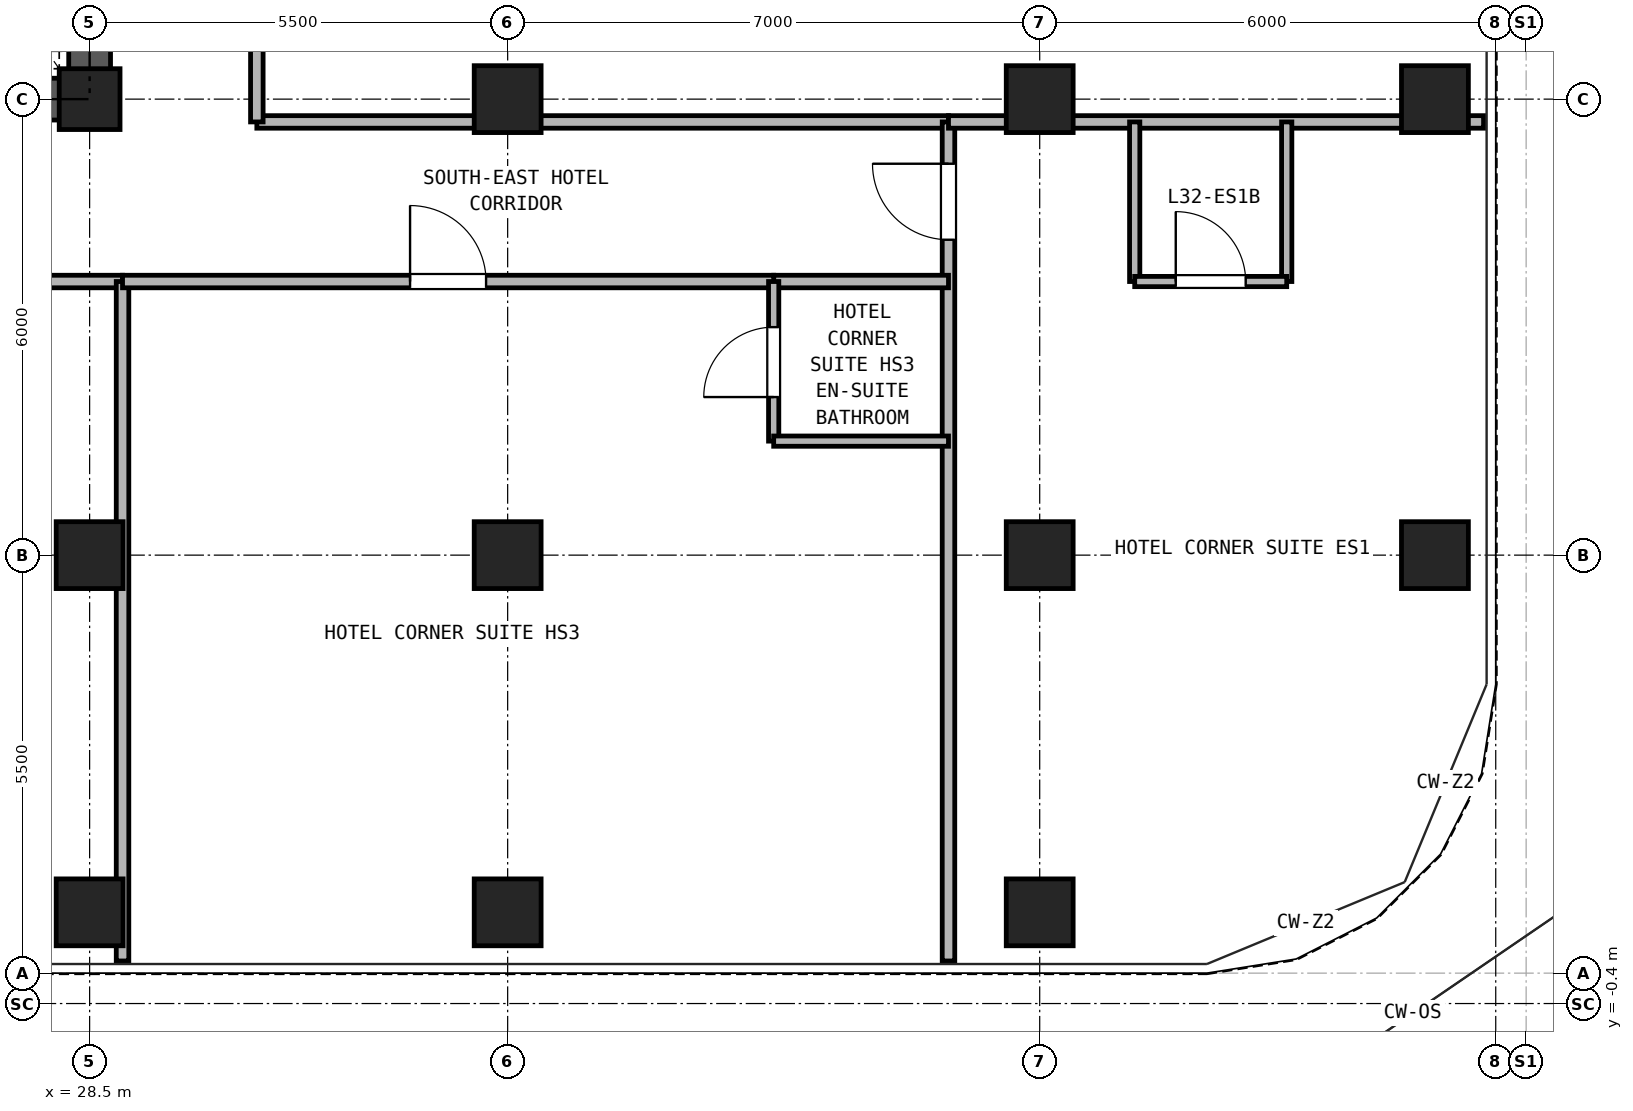
"""IFC4 building model, lengths in metres.
Left out: names, types, materials, properties, quantities, classifications, styles, units other than length and angle.
Written with IfcOpenShell. Run it as: python <this file> out.ifc"""

import sys

from ifc_helpers import new_model, si_unit, direction, frame, frame_2d, origin, origin_2d, place, context, subcontext, project, spatial, rectangle, hollow_rectangle, extrude, source, transform, mapped, element, fill, save


model = new_model("IFC4")
c1 = context("Model", 3, precision=1e-05, world=origin(), true_north=direction((0.0, 1.0)))
c2 = subcontext(c1, "Body", "Model", "MODEL_VIEW")
j1 = project(units=[si_unit("LENGTHUNIT", "METRE"), si_unit("PLANEANGLEUNIT", "RADIAN")], contexts=[c1])
p1 = place(None, origin())
s1 = spatial("IfcSite", under=j1, at=p1, CompositionType="ELEMENT")
p2 = place(p1, origin())
s2 = spatial("IfcBuilding", under=s1, at=p2, CompositionType="ELEMENT")
p3 = place(p2, frame((0.0, 0.0, 118.3)))
s3 = spatial("IfcBuildingStorey", under=s2, at=p3, CompositionType="ELEMENT", Elevation=118.3)
m1 = source(origin(), c2, "Body", "SweptSolid", [
    extrude(hollow_rectangle(XDim=0.88, YDim=0.88, WallThickness=0.05, at=origin_2d()), origin(), (0.0, 0.0, 1.0), 2.95),
])
for number, where, z_axis, x_axis in (
    (1, (28.5, 0.8, 0.0), (0.0, 0.0, 1.0), (1.0, 0.0, 0.0)),
    (2, (34.0, 0.8, 0.0), (0.0, 0.0, 1.0), (1.0, 0.0, 0.0)),
    (3, (41.0, 0.8, 0.0), (0.0, 0.0, 1.0), (1.0, 0.0, 0.0)),
    (4, (46.2, 5.5, 0.0), (0.0, 0.0, 1.0), (1.0, 0.0, 0.0)),
    (5, (46.2, 11.5, 0.0), (0.0, 0.0, 1.0), (1.0, 0.0, 0.0)),
    (6, (28.5, 5.5, 0.0), (0.0, 0.0, 1.0), (1.0, 0.0, 0.0)),
):
    element("IfcColumn", number, at=place(p3, frame(where, z_axis=z_axis, x_axis=x_axis)), inside=s3, PredefinedType="COLUMN", context=c2, shape_type="MappedRepresentation", body=[
        mapped(m1, transform((0.0, 0.0, 0.0), x_axis=(1.0, 0.0, 0.0), y_axis=(0.0, 1.0, 0.0), z_axis=(0.0, 0.0, 1.0), scale=1.0)),
    ])
m2 = source(origin(), c2, "Body", "SweptSolid", [
    extrude(hollow_rectangle(XDim=0.8, YDim=0.8, WallThickness=0.045, at=origin_2d()), origin(), (0.0, 0.0, 1.0), 2.95),
])
p4 = place(p3, frame((28.5, 11.5, 0.0), z_axis=(0.0, 0.0, 1.0), x_axis=(1.0, 0.0, 0.0)))
e7 = element("IfcColumn", 7, at=p4, inside=s3, PredefinedType="COLUMN", context=c2, shape_type="MappedRepresentation", body=[
    mapped(m2, transform((0.0, 0.0, 0.0), x_axis=(1.0, 0.0, 0.0), y_axis=(0.0, 1.0, 0.0), z_axis=(0.0, 0.0, 1.0), scale=1.0)),
])
for number, where, z_axis, x_axis in (
    (8, (34.0, 5.5, 0.0), (0.0, 0.0, 1.0), (1.0, 0.0, 0.0)),
    (9, (34.0, 11.5, 0.0), (0.0, 0.0, 1.0), (1.0, 0.0, 0.0)),
    (10, (41.0, 5.5, 0.0), (0.0, 0.0, 1.0), (1.0, 0.0, 0.0)),
    (11, (41.0, 11.5, 0.0), (0.0, 0.0, 1.0), (1.0, 0.0, 0.0)),
):
    element("IfcColumn", number, at=place(p3, frame(where, z_axis=z_axis, x_axis=x_axis)), inside=s3, PredefinedType="COLUMN", context=c2, shape_type="MappedRepresentation", body=[
        mapped(m1, transform((0.0, 0.0, 0.0), x_axis=(1.0, 0.0, 0.0), y_axis=(0.0, 1.0, 0.0), z_axis=(0.0, 0.0, 1.0), scale=1.0)),
    ])
p5 = place(p3, frame((18.225, 11.5, 0.0), z_axis=(0.0, 0.0, 1.0), x_axis=(1.0, 0.0, 0.0)))
e12 = element("IfcWall", 12, at=p5, inside=s3, PredefinedType="SHEAR", context=c2, shape_type="SweptSolid", body=[
    extrude(rectangle(XDim=10.55, YDim=0.55, at=frame_2d((5.275, 0.0))), origin(), (0.0, 0.0, 1.0), 2.95),
])
p6 = place(p5, frame((2.375, 0.0, 0.0)))
e13 = element("IfcOpeningElement", 13, at=p6, cuts=e12, PredefinedType="OPENING", context=c2, shape_type="SweptSolid", body=[
    extrude(rectangle(XDim=0.95, YDim=2.15, at=frame_2d((0.475, 1.075))), frame((0.0, 0.285, 0.0), z_axis=(0.0, -1.0, 0.0), x_axis=(1.0, 0.0, 0.0)), (0.0, 0.0, 1.0), 0.57),
])
p7 = place(p5, frame((5.875, 0.0, 0.0)))
e14 = element("IfcOpeningElement", 14, at=p7, cuts=e12, PredefinedType="OPENING", context=c2, shape_type="SweptSolid", body=[
    extrude(rectangle(XDim=1.1, YDim=2.25, at=frame_2d((0.55, 1.125))), frame((0.0, 0.285, 0.0), z_axis=(0.0, -1.0, 0.0), x_axis=(1.0, 0.0, 0.0)), (0.0, 0.0, 1.0), 0.57),
])
p8 = place(p5, frame((8.275, 0.0, 0.0)))
e15 = element("IfcOpeningElement", 15, at=p8, cuts=e12, PredefinedType="OPENING", context=c2, shape_type="SweptSolid", body=[
    extrude(rectangle(XDim=1.1, YDim=2.25, at=frame_2d((0.55, 1.125))), frame((0.0, 0.285, 0.0), z_axis=(0.0, -1.0, 0.0), x_axis=(1.0, 0.0, 0.0)), (0.0, 0.0, 1.0), 0.57),
])
p9 = place(p3, frame((28.5, 11.775, 0.0), z_axis=(0.0, 0.0, 1.0), x_axis=(0.0, 1.0, 0.0)))
e16 = element("IfcWall", 16, at=p9, inside=s3, PredefinedType="SHEAR", context=c2, shape_type="SweptSolid", body=[
    extrude(rectangle(XDim=16.7, YDim=0.55, at=frame_2d((8.35, 0.0))), origin(), (0.0, 0.0, 1.0), 2.95),
])
p10 = place(p9, frame((7.375, 0.0, 0.0)))
e17 = element("IfcOpeningElement", 17, at=p10, cuts=e16, PredefinedType="OPENING", context=c2, shape_type="SweptSolid", body=[
    extrude(rectangle(XDim=1.15, YDim=2.2, at=frame_2d((0.575, 1.1))), frame((0.0, 0.285, 0.0), z_axis=(0.0, -1.0, 0.0), x_axis=(1.0, 0.0, 0.0)), (0.0, 0.0, 1.0), 0.57),
])
p11 = place(p3, frame((30.7, 11.2, 0.0), z_axis=(0.0, 0.0, 1.0), x_axis=(1.0, 0.0, 0.0)))
e18 = element("IfcWall", 18, at=p11, inside=s3, PredefinedType="PARTITIONING", context=c2, shape_type="SweptSolid", body=[
    extrude(rectangle(XDim=9.1, YDim=0.165, at=frame_2d((4.55, 0.0))), origin(), (0.0, 0.0, 1.0), 2.95),
])
p12 = place(p3, frame((30.7, 11.2, 0.0), z_axis=(0.0, 0.0, 1.0), x_axis=(0.0, 1.0, 0.0)))
e19 = element("IfcWall", 19, at=p12, inside=s3, PredefinedType="PARTITIONING", context=c2, shape_type="SweptSolid", body=[
    extrude(rectangle(XDim=18.75, YDim=0.165, at=frame_2d((9.375, 0.0))), origin(), (0.0, 0.0, 1.0), 2.95),
])
p13 = place(p12, frame((2.6, 0.0, 0.0)))
e20 = element("IfcOpeningElement", 20, at=p13, cuts=e19, PredefinedType="OPENING", context=c2, shape_type="SweptSolid", body=[
    extrude(rectangle(XDim=0.95, YDim=2.15, at=frame_2d((0.475, 1.075))), frame((0.0, 0.093, 0.0), z_axis=(0.0, -1.0, 0.0), x_axis=(1.0, 0.0, 0.0)), (0.0, 0.0, 1.0), 0.185),
])
p14 = place(p12, frame((8.8, 0.0, 0.0)))
e21 = element("IfcOpeningElement", 21, at=p14, cuts=e19, PredefinedType="OPENING", context=c2, shape_type="SweptSolid", body=[
    extrude(rectangle(XDim=0.95, YDim=2.15, at=frame_2d((0.475, 1.075))), frame((0.0, 0.093, 0.0), z_axis=(0.0, -1.0, 0.0), x_axis=(1.0, 0.0, 0.0)), (0.0, 0.0, 1.0), 0.185),
])
p15 = place(p12, frame((15.075, 0.0, 0.0)))
e22 = element("IfcOpeningElement", 22, at=p15, cuts=e19, PredefinedType="OPENING", context=c2, shape_type="SweptSolid", body=[
    extrude(rectangle(XDim=0.95, YDim=2.15, at=frame_2d((0.475, 1.075))), frame((0.0, 0.093, 0.0), z_axis=(0.0, -1.0, 0.0), x_axis=(1.0, 0.0, 0.0)), (0.0, 0.0, 1.0), 0.185),
])
p16 = place(p3, frame((39.8, 0.16, 0.0), z_axis=(0.0, 0.0, 1.0), x_axis=(0.0, 1.0, 0.0)))
e23 = element("IfcWall", 23, at=p16, inside=s3, PredefinedType="PARTITIONING", context=c2, shape_type="SweptSolid", body=[
    extrude(rectangle(XDim=11.04, YDim=0.165, at=frame_2d((5.52, 0.0))), origin(), (0.0, 0.0, 1.0), 2.95),
])
p17 = place(p16, frame((9.49, 0.0, 0.0)))
e24 = element("IfcOpeningElement", 24, at=p17, cuts=e23, PredefinedType="OPENING", context=c2, shape_type="SweptSolid", body=[
    extrude(rectangle(XDim=1.0, YDim=2.15, at=frame_2d((0.5, 1.075))), frame((0.0, 0.093, 0.0), z_axis=(0.0, -1.0, 0.0), x_axis=(1.0, 0.0, 0.0)), (0.0, 0.0, 1.0), 0.185),
])
p18 = place(p3, frame((39.8, 11.2, 0.0), z_axis=(0.0, 0.0, 1.0), x_axis=(1.0, 0.0, 0.0)))
e25 = element("IfcWall", 25, at=p18, inside=s3, PredefinedType="PARTITIONING", context=c2, shape_type="SweptSolid", body=[
    extrude(rectangle(XDim=7.04, YDim=0.165, at=frame_2d((3.52, 0.0))), origin(), (0.0, 0.0, 1.0), 2.95),
])
for number, where, z_axis, x_axis in (
    (26, (42.25, 9.1, 0.0), (0.0, 0.0, 1.0), (0.0, 1.0, 0.0)),
    (27, (44.25, 9.1, 0.0), (0.0, 0.0, 1.0), (0.0, 1.0, 0.0)),
):
    element("IfcWall", number, at=place(p3, frame(where, z_axis=z_axis, x_axis=x_axis)), inside=s3, PredefinedType="PARTITIONING", context=c2, shape_type="SweptSolid", body=[
        extrude(rectangle(XDim=2.1, YDim=0.135, at=frame_2d((1.05, 0.0))), origin(), (0.0, 0.0, 1.0), 2.95),
    ])
p19 = place(p3, frame((42.25, 9.1, 0.0), z_axis=(0.0, 0.0, 1.0), x_axis=(1.0, 0.0, 0.0)))
e28 = element("IfcWall", 28, at=p19, inside=s3, PredefinedType="PARTITIONING", context=c2, shape_type="SweptSolid", body=[
    extrude(rectangle(XDim=2.0, YDim=0.135, at=frame_2d((1.0, 0.0))), origin(), (0.0, 0.0, 1.0), 2.95),
])
p20 = place(p19, frame((0.54, 0.0, 0.0)))
e29 = element("IfcOpeningElement", 29, at=p20, cuts=e28, PredefinedType="OPENING", context=c2, shape_type="SweptSolid", body=[
    extrude(rectangle(XDim=0.92, YDim=2.1, at=frame_2d((0.46, 1.05))), frame((0.0, 0.077, 0.0), z_axis=(0.0, -1.0, 0.0), x_axis=(1.0, 0.0, 0.0)), (0.0, 0.0, 1.0), 0.155),
])
p21 = place(p3, frame((20.367, 9.1, 0.0), z_axis=(0.0, 0.0, 1.0), x_axis=(1.0, 0.0, 0.0)))
e30 = element("IfcWall", 30, at=p21, inside=s3, PredefinedType="PARTITIONING", context=c2, shape_type="SweptSolid", body=[
    extrude(rectangle(XDim=8.566, YDim=0.165, at=frame_2d((4.283, 0.0))), origin(), (0.0, 0.0, 1.0), 2.95),
])
p22 = place(p21, frame((3.783, 0.0, 0.0)))
e31 = element("IfcOpeningElement", 31, at=p22, cuts=e30, PredefinedType="OPENING", context=c2, shape_type="SweptSolid", body=[
    extrude(rectangle(XDim=1.0, YDim=2.15, at=frame_2d((0.5, 1.075))), frame((0.0, 0.093, 0.0), z_axis=(0.0, -1.0, 0.0), x_axis=(1.0, 0.0, 0.0)), (0.0, 0.0, 1.0), 0.185),
])
p23 = place(p3, frame((28.933, 0.16, 0.0), z_axis=(0.0, 0.0, 1.0), x_axis=(0.0, 1.0, 0.0)))
e32 = element("IfcWall", 32, at=p23, inside=s3, PredefinedType="PARTITIONING", context=c2, shape_type="SweptSolid", body=[
    extrude(rectangle(XDim=8.94, YDim=0.165, at=frame_2d((4.47, 0.0))), origin(), (0.0, 0.0, 1.0), 2.95),
])
p24 = place(p3, frame((37.5, 9.1, 0.0), z_axis=(0.0, 0.0, 1.0), x_axis=(1.0, 0.0, 0.0)))
e33 = element("IfcWall", 33, at=p24, inside=s3, PredefinedType="PARTITIONING", context=c2, shape_type="SweptSolid", body=[
    extrude(rectangle(XDim=2.3, YDim=0.165, at=frame_2d((1.15, 0.0))), origin(), (0.0, 0.0, 1.0), 2.95),
])
p25 = place(p3, frame((28.933, 9.1, 0.0), z_axis=(0.0, 0.0, 1.0), x_axis=(1.0, 0.0, 0.0)))
e34 = element("IfcWall", 34, at=p25, inside=s3, PredefinedType="PARTITIONING", context=c2, shape_type="SweptSolid", body=[
    extrude(rectangle(XDim=8.567, YDim=0.165, at=frame_2d((4.283, 0.0))), origin(), (0.0, 0.0, 1.0), 2.95),
])
p26 = place(p25, frame((3.783, 0.0, 0.0)))
e35 = element("IfcOpeningElement", 35, at=p26, cuts=e34, PredefinedType="OPENING", context=c2, shape_type="SweptSolid", body=[
    extrude(rectangle(XDim=1.0, YDim=2.15, at=frame_2d((0.5, 1.075))), frame((0.0, 0.093, 0.0), z_axis=(0.0, -1.0, 0.0), x_axis=(1.0, 0.0, 0.0)), (0.0, 0.0, 1.0), 0.185),
])
p27 = place(p3, frame((37.5, 7.0, 0.0), z_axis=(0.0, 0.0, 1.0), x_axis=(0.0, 1.0, 0.0)))
e36 = element("IfcWall", 36, at=p27, inside=s3, PredefinedType="PARTITIONING", context=c2, shape_type="SweptSolid", body=[
    extrude(rectangle(XDim=2.1, YDim=0.135, at=frame_2d((1.05, 0.0))), origin(), (0.0, 0.0, 1.0), 2.95),
])
p28 = place(p27, frame((0.58, 0.0, 0.0)))
e37 = element("IfcOpeningElement", 37, at=p28, cuts=e36, PredefinedType="OPENING", context=c2, shape_type="SweptSolid", body=[
    extrude(rectangle(XDim=0.92, YDim=2.1, at=frame_2d((0.46, 1.05))), frame((0.0, 0.077, 0.0), z_axis=(0.0, -1.0, 0.0), x_axis=(1.0, 0.0, 0.0)), (0.0, 0.0, 1.0), 0.155),
])
p29 = place(p3, frame((37.5, 7.0, 0.0), z_axis=(0.0, 0.0, 1.0), x_axis=(1.0, 0.0, 0.0)))
e38 = element("IfcWall", 38, at=p29, inside=s3, PredefinedType="PARTITIONING", context=c2, shape_type="SweptSolid", body=[
    extrude(rectangle(XDim=2.3, YDim=0.135, at=frame_2d((1.15, 0.0))), origin(), (0.0, 0.0, 1.0), 2.95),
])
p30 = place(p20, origin())
e39 = element("IfcDoor", 39, at=p30, inside=s3, OperationType="SINGLE_SWING_LEFT", PredefinedType="DOOR", context=c2, shape_type="SweptSolid", body=[
    extrude(rectangle(XDim=0.92, YDim=2.1, at=frame_2d((0.46, 1.05))), frame((0.0, 0.025, 0.0), z_axis=(0.0, -1.0, 0.0), x_axis=(1.0, 0.0, 0.0)), (0.0, 0.0, 1.0), 0.05),
])
fill(e29, e39)
p31 = place(p17, frame((1.0, 0.0, 0.0), z_axis=(0.0, 0.0, 1.0), x_axis=(-1.0, 0.0, 0.0)))
e40 = element("IfcDoor", 40, at=p31, inside=s3, OperationType="SINGLE_SWING_RIGHT", PredefinedType="DOOR", context=c2, shape_type="SweptSolid", body=[
    extrude(rectangle(XDim=1.0, YDim=2.15, at=frame_2d((0.5, 1.075))), frame((0.0, 0.025, 0.0), z_axis=(0.0, -1.0, 0.0), x_axis=(1.0, 0.0, 0.0)), (0.0, 0.0, 1.0), 0.05),
])
fill(e24, e40)
p32 = place(p28, origin())
e41 = element("IfcDoor", 41, at=p32, inside=s3, OperationType="SINGLE_SWING_LEFT", PredefinedType="DOOR", context=c2, shape_type="SweptSolid", body=[
    extrude(rectangle(XDim=0.92, YDim=2.1, at=frame_2d((0.46, 1.05))), frame((0.0, 0.025, 0.0), z_axis=(0.0, -1.0, 0.0), x_axis=(1.0, 0.0, 0.0)), (0.0, 0.0, 1.0), 0.05),
])
fill(e37, e41)
p33 = place(p26, frame((1.0, 0.0, 0.0), z_axis=(0.0, 0.0, 1.0), x_axis=(-1.0, 0.0, 0.0)))
e42 = element("IfcDoor", 42, at=p33, inside=s3, OperationType="SINGLE_SWING_LEFT", PredefinedType="DOOR", context=c2, shape_type="SweptSolid", body=[
    extrude(rectangle(XDim=1.0, YDim=2.15, at=frame_2d((0.5, 1.075))), frame((0.0, 0.025, 0.0), z_axis=(0.0, -1.0, 0.0), x_axis=(1.0, 0.0, 0.0)), (0.0, 0.0, 1.0), 0.05),
])
fill(e35, e42)
save(model, sys.argv[1])
